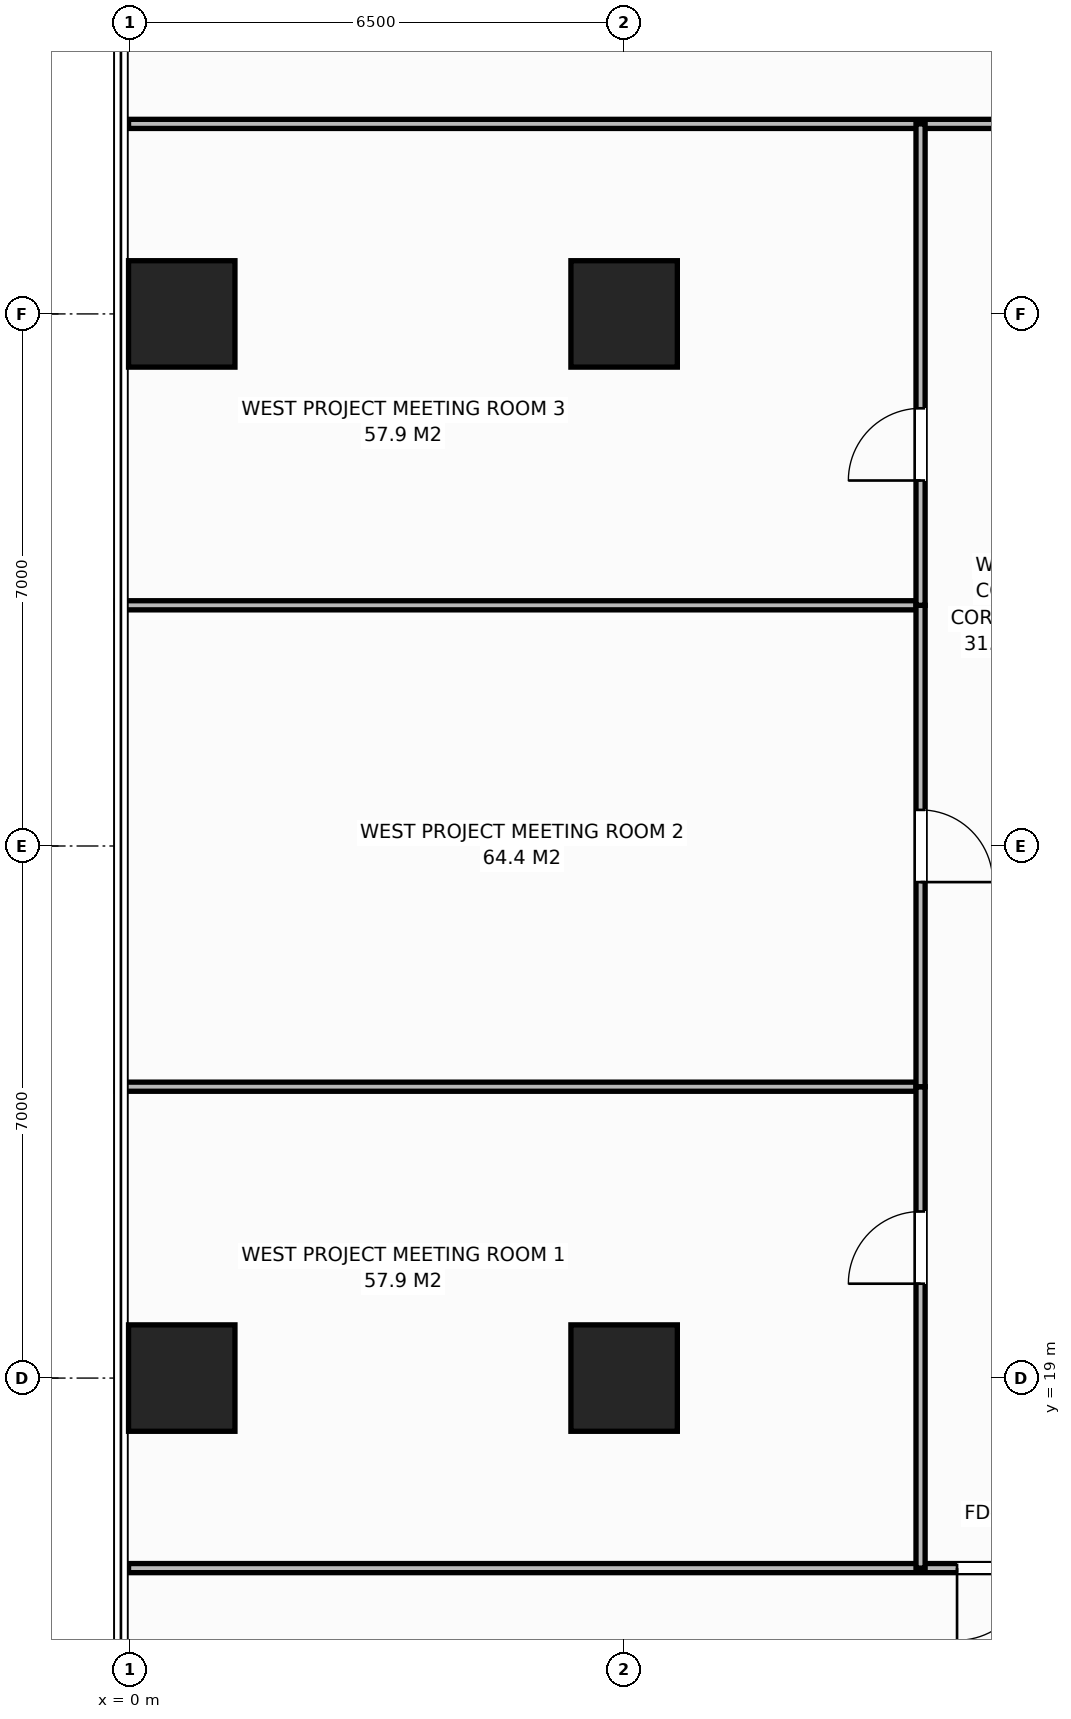
"""IFC4 building model, lengths in metres.
Left out: names, types, materials, properties, quantities, classifications, styles, units other than length and angle.
Written with IfcOpenShell. Run it as: python <this file> out.ifc"""

import sys

from ifc_helpers import new_model, si_unit, direction, frame, frame_2d, origin, origin_2d, place, context, subcontext, project, spatial, rectangle, extrude, element, fill, save


model = new_model("IFC4")
c1 = context("Model", 3, precision=1e-05, world=origin(), true_north=direction((0.0, 1.0)))
c2 = subcontext(c1, "Body", "Model", "MODEL_VIEW")
j1 = project(units=[si_unit("LENGTHUNIT", "METRE"), si_unit("PLANEANGLEUNIT", "RADIAN")], contexts=[c1])
p1 = place(None, origin())
s1 = spatial("IfcSite", under=j1, at=p1, CompositionType="ELEMENT")
p2 = place(p1, origin())
s2 = spatial("IfcBuilding", under=s1, at=p2, CompositionType="ELEMENT")
p3 = place(p2, frame((0.0, 0.0, 58.2)))
s3 = spatial("IfcBuildingStorey", under=s2, at=p3, CompositionType="ELEMENT", Elevation=58.2)
for number, where, z_axis, x_axis in (
    (1, (6.5, 19.0, 0.0), (0.0, 0.0, 1.0), (1.0, 0.0, 0.0)),
    (2, (6.5, 33.0, 0.0), (0.0, 0.0, 1.0), (1.0, 0.0, 0.0)),
    (3, (0.68, 19.0, 0.0), (0.0, 0.0, 1.0), (1.0, 0.0, 0.0)),
    (4, (0.68, 33.0, 0.0), (0.0, 0.0, 1.0), (1.0, 0.0, 0.0)),
):
    element("IfcColumn", number, at=place(p3, frame(where, z_axis=z_axis, x_axis=x_axis)), inside=s3, PredefinedType="COLUMN", context=c2, shape_type="SweptSolid", body=[
        extrude(rectangle(XDim=1.4, YDim=1.4, at=origin_2d()), origin(), (0.0, 0.0, 1.0), 3.8),
    ])
p4 = place(p3, frame((-0.02, 35.5, 0.0), z_axis=(0.0, 0.0, 1.0), x_axis=(1.0, 0.0, 0.0)))
e5 = element("IfcWall", 5, at=p4, inside=s3, PredefinedType="PARTITIONING", context=c2, shape_type="SweptSolid", body=[
    extrude(rectangle(XDim=25.396, YDim=0.12, at=frame_2d((12.698, 0.0))), origin(), (0.0, 0.0, 1.0), 3.55),
])
p5 = place(p4, frame((17.433, 0.0, 0.0)))
e6 = element("IfcOpeningElement", 6, at=p5, cuts=e5, PredefinedType="OPENING", context=c2, shape_type="SweptSolid", body=[
    extrude(rectangle(XDim=0.95, YDim=2.15, at=frame_2d((0.475, 1.075))), frame((0.0, 0.07, 0.0), z_axis=(0.0, -1.0, 0.0), x_axis=(1.0, 0.0, 0.0)), (0.0, 0.0, 1.0), 0.14),
])
p6 = place(p3, frame((-0.02, 16.5, 0.0), z_axis=(0.0, 0.0, 1.0), x_axis=(1.0, 0.0, 0.0)))
e7 = element("IfcWall", 7, at=p6, inside=s3, PredefinedType="PARTITIONING", context=c2, shape_type="SweptSolid", body=[
    extrude(rectangle(XDim=29.041, YDim=0.12, at=frame_2d((14.521, 0.0))), origin(), (0.0, 0.0, 1.0), 3.55),
])
p7 = place(p6, frame((10.9, 0.0, 0.0)))
e8 = element("IfcOpeningElement", 8, at=p7, cuts=e7, PredefinedType="OPENING", context=c2, shape_type="SweptSolid", body=[
    extrude(rectangle(XDim=0.95, YDim=2.15, at=frame_2d((0.475, 1.075))), frame((0.0, 0.07, 0.0), z_axis=(0.0, -1.0, 0.0), x_axis=(1.0, 0.0, 0.0)), (0.0, 0.0, 1.0), 0.14),
])
p8 = place(p3, frame((-0.18, 22.833, 0.0), z_axis=(0.0, 0.0, 1.0), x_axis=(1.0, 0.0, 0.0)))
e9 = element("IfcWall", 9, at=p8, inside=s3, PredefinedType="PARTITIONING", context=c2, shape_type="SweptSolid", body=[
    extrude(rectangle(XDim=10.58, YDim=0.12, at=frame_2d((5.29, 0.0))), origin(), (0.0, 0.0, 1.0), 3.55),
])
p9 = place(p3, frame((10.4, 16.5, 0.0), z_axis=(0.0, 0.0, 1.0), x_axis=(0.0, 1.0, 0.0)))
e10 = element("IfcWall", 10, at=p9, inside=s3, PredefinedType="PARTITIONING", context=c2, shape_type="SweptSolid", body=[
    extrude(rectangle(XDim=6.333, YDim=0.12, at=frame_2d((3.167, 0.0))), origin(), (0.0, 0.0, 1.0), 3.55),
])
p10 = place(p9, frame((3.742, 0.0, 0.0)))
e11 = element("IfcOpeningElement", 11, at=p10, cuts=e10, PredefinedType="OPENING", context=c2, shape_type="SweptSolid", body=[
    extrude(rectangle(XDim=0.95, YDim=2.15, at=frame_2d((0.475, 1.075))), frame((0.0, 0.07, 0.0), z_axis=(0.0, -1.0, 0.0), x_axis=(1.0, 0.0, 0.0)), (0.0, 0.0, 1.0), 0.14),
])
p11 = place(p3, frame((-0.18, 29.167, 0.0), z_axis=(0.0, 0.0, 1.0), x_axis=(1.0, 0.0, 0.0)))
e12 = element("IfcWall", 12, at=p11, inside=s3, PredefinedType="PARTITIONING", context=c2, shape_type="SweptSolid", body=[
    extrude(rectangle(XDim=10.58, YDim=0.12, at=frame_2d((5.29, 0.0))), origin(), (0.0, 0.0, 1.0), 3.55),
])
p12 = place(p3, frame((10.4, 22.833, 0.0), z_axis=(0.0, 0.0, 1.0), x_axis=(0.0, 1.0, 0.0)))
e13 = element("IfcWall", 13, at=p12, inside=s3, PredefinedType="PARTITIONING", context=c2, shape_type="SweptSolid", body=[
    extrude(rectangle(XDim=6.333, YDim=0.12, at=frame_2d((3.167, 0.0))), origin(), (0.0, 0.0, 1.0), 3.55),
])
p13 = place(p12, frame((2.692, 0.0, 0.0)))
e14 = element("IfcOpeningElement", 14, at=p13, cuts=e13, PredefinedType="OPENING", context=c2, shape_type="SweptSolid", body=[
    extrude(rectangle(XDim=0.95, YDim=2.15, at=frame_2d((0.475, 1.075))), frame((0.0, 0.07, 0.0), z_axis=(0.0, -1.0, 0.0), x_axis=(1.0, 0.0, 0.0)), (0.0, 0.0, 1.0), 0.14),
])
p14 = place(p3, frame((10.4, 29.167, 0.0), z_axis=(0.0, 0.0, 1.0), x_axis=(0.0, 1.0, 0.0)))
e15 = element("IfcWall", 15, at=p14, inside=s3, PredefinedType="PARTITIONING", context=c2, shape_type="SweptSolid", body=[
    extrude(rectangle(XDim=6.333, YDim=0.12, at=frame_2d((3.167, 0.0))), origin(), (0.0, 0.0, 1.0), 3.55),
])
p15 = place(p14, frame((1.642, 0.0, 0.0)))
e16 = element("IfcOpeningElement", 16, at=p15, cuts=e15, PredefinedType="OPENING", context=c2, shape_type="SweptSolid", body=[
    extrude(rectangle(XDim=0.95, YDim=2.15, at=frame_2d((0.475, 1.075))), frame((0.0, 0.07, 0.0), z_axis=(0.0, -1.0, 0.0), x_axis=(1.0, 0.0, 0.0)), (0.0, 0.0, 1.0), 0.14),
])
p16 = place(p7, origin())
e17 = element("IfcDoor", 17, at=p16, inside=s3, OperationType="SINGLE_SWING_RIGHT", PredefinedType="DOOR", context=c2, shape_type="SweptSolid", body=[
    extrude(rectangle(XDim=0.95, YDim=2.15, at=frame_2d((0.475, 1.075))), frame((0.0, 0.025, 0.0), z_axis=(0.0, -1.0, 0.0), x_axis=(1.0, 0.0, 0.0)), (0.0, 0.0, 1.0), 0.05),
])
fill(e8, e17)
p17 = place(p10, origin())
e18 = element("IfcDoor", 18, at=p17, inside=s3, OperationType="SINGLE_SWING_LEFT", PredefinedType="DOOR", context=c2, shape_type="SweptSolid", body=[
    extrude(rectangle(XDim=0.95, YDim=2.15, at=frame_2d((0.475, 1.075))), frame((0.0, 0.025, 0.0), z_axis=(0.0, -1.0, 0.0), x_axis=(1.0, 0.0, 0.0)), (0.0, 0.0, 1.0), 0.05),
])
fill(e11, e18)
p18 = place(p13, origin())
e19 = element("IfcDoor", 19, at=p18, inside=s3, OperationType="SINGLE_SWING_RIGHT", PredefinedType="DOOR", context=c2, shape_type="SweptSolid", body=[
    extrude(rectangle(XDim=0.95, YDim=2.15, at=frame_2d((0.475, 1.075))), frame((0.0, 0.025, 0.0), z_axis=(0.0, -1.0, 0.0), x_axis=(1.0, 0.0, 0.0)), (0.0, 0.0, 1.0), 0.05),
])
fill(e14, e19)
p19 = place(p15, origin())
e20 = element("IfcDoor", 20, at=p19, inside=s3, OperationType="SINGLE_SWING_LEFT", PredefinedType="DOOR", context=c2, shape_type="SweptSolid", body=[
    extrude(rectangle(XDim=0.95, YDim=2.15, at=frame_2d((0.475, 1.075))), frame((0.0, 0.025, 0.0), z_axis=(0.0, -1.0, 0.0), x_axis=(1.0, 0.0, 0.0)), (0.0, 0.0, 1.0), 0.05),
])
fill(e16, e20)
save(model, sys.argv[1])
